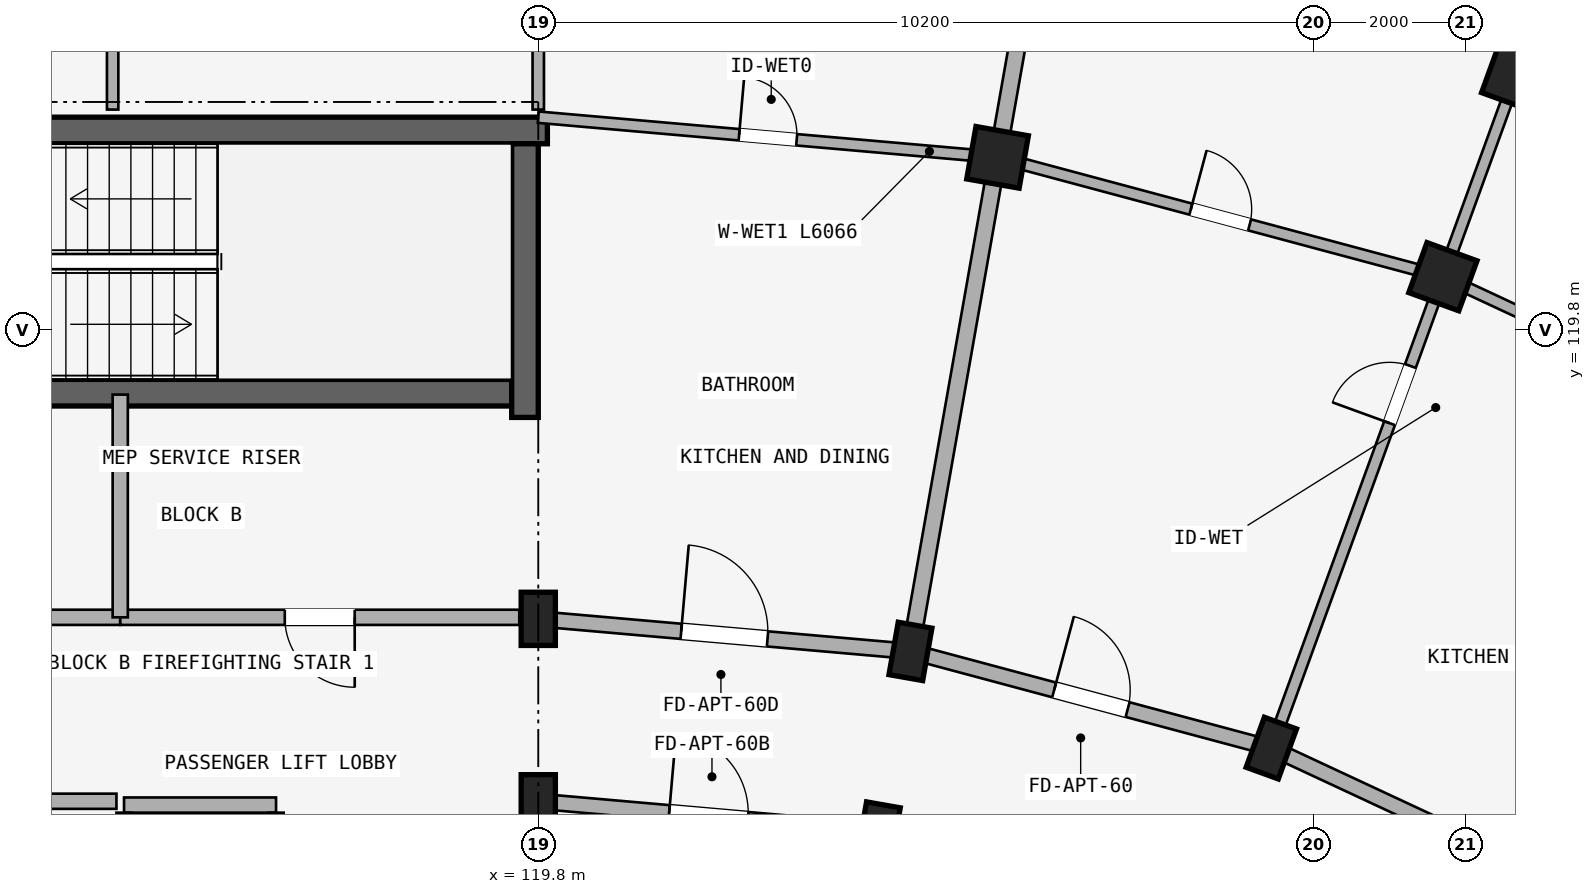
"""IFC4 building model, lengths in metres.
Left out: names, types, materials, properties, quantities, classifications, styles, units other than length and angle.
Written with IfcOpenShell. Run it as: python <this file> out.ifc"""

import sys

from ifc_helpers import new_model, si_unit, direction, frame, frame_2d, origin, origin_2d, place, context, subcontext, project, spatial, rectangle, extrude, element, fill, save


model = new_model("IFC4")
c1 = context("Model", 3, precision=1e-05, world=origin(), true_north=direction((0.0, 1.0)))
c2 = subcontext(c1, "Body", "Model", "MODEL_VIEW")
j1 = project(units=[si_unit("LENGTHUNIT", "METRE"), si_unit("PLANEANGLEUNIT", "RADIAN")], contexts=[c1])
p1 = place(None, origin())
s1 = spatial("IfcSite", under=j1, at=p1, CompositionType="ELEMENT")
p2 = place(p1, origin())
s2 = spatial("IfcBuilding", under=s1, at=p2, CompositionType="ELEMENT")
p3 = place(p2, frame((0.0, 0.0, 18.15)))
s3 = spatial("IfcBuildingStorey", under=s2, at=p3, CompositionType="ELEMENT", Elevation=18.15)
p4 = place(p3, frame((119.92, 122.425, 0.0), z_axis=(0.0, 0.0, 1.0), x_axis=(-1.0, 0.0, 0.0)))
e1 = element("IfcWall", 1, at=p4, inside=s3, PredefinedType="SHEAR", context=c2, shape_type="SweptSolid", body=[
    extrude(rectangle(XDim=8.545, YDim=0.35, at=frame_2d((4.272, 0.0))), origin(), (0.0, 0.0, 1.0), 2.93),
])
p5 = place(p3, frame((119.45, 118.975, 0.0), z_axis=(0.0, 0.0, 1.0), x_axis=(-1.0, 0.0, 0.0)))
e2 = element("IfcWall", 2, at=p5, inside=s3, PredefinedType="SHEAR", context=c2, shape_type="SweptSolid", body=[
    extrude(rectangle(XDim=8.075, YDim=0.35, at=frame_2d((4.038, 0.0))), origin(), (0.0, 0.0, 1.0), 2.93),
])
p6 = place(p5, frame((6.38, 0.0, 0.0)))
e3 = element("IfcOpeningElement", 3, at=p6, cuts=e2, PredefinedType="OPENING", context=c2, shape_type="SweptSolid", body=[
    extrude(rectangle(XDim=1.24, YDim=2.15, at=frame_2d((0.62, 1.075))), frame((0.0, 0.185, 0.0), z_axis=(0.0, -1.0, 0.0), x_axis=(1.0, 0.0, 0.0)), (0.0, 0.0, 1.0), 0.37),
])
p7 = place(p3, frame((119.625, 118.65, 0.0), z_axis=(0.0, 0.0, 1.0), x_axis=(0.0, 1.0, 0.0)))
e4 = element("IfcWall", 4, at=p7, inside=s3, PredefinedType="SHEAR", context=c2, shape_type="SweptSolid", body=[
    extrude(rectangle(XDim=3.6, YDim=0.35, at=frame_2d((1.8, 0.0))), origin(), (0.0, 0.0, 1.0), 2.93),
])
for number, where, z_axis, x_axis in (
    (5, (119.8, 113.6, 0.0), (0.0, 0.0, 1.0), (1.0, 0.0, 0.0)),
    (6, (119.8, 116.0, 0.0), (0.0, 0.0, 1.0), (1.0, 0.0, 0.0)),
    (7, (124.28, 113.208, 0.0), (0.0, 0.0, 1.0), (-0.985, 0.174, 0.0)),
    (8, (124.697, 115.572, 0.0), (0.0, 0.0, 1.0), (-0.985, 0.174, 0.0)),
):
    element("IfcColumn", number, at=place(p3, frame(where, z_axis=z_axis, x_axis=x_axis)), inside=s3, PredefinedType="COLUMN", context=c2, shape_type="SweptSolid", body=[
        extrude(rectangle(XDim=0.45, YDim=0.7, at=origin_2d()), origin(), (0.0, 0.0, 1.0), 2.93),
    ])
p8 = place(p3, frame((125.843, 122.071, 0.0), z_axis=(0.0, 0.0, 1.0), x_axis=(-0.984807753012, 0.173648177667, 0.0)))
e9 = element("IfcColumn", 9, at=p8, inside=s3, PredefinedType="COLUMN", context=c2, shape_type="SweptSolid", body=[
    extrude(rectangle(XDim=0.7, YDim=0.7, at=origin_2d()), origin(), (0.0, 0.0, 1.0), 2.93),
])
p9 = place(p3, frame((129.445, 114.299, 0.0), z_axis=(0.0, 0.0, 1.0), x_axis=(-0.939692620786, 0.342020143326, 0.0)))
e10 = element("IfcColumn", 10, at=p9, inside=s3, PredefinedType="COLUMN", context=c2, shape_type="SweptSolid", body=[
    extrude(rectangle(XDim=0.45, YDim=0.7, at=origin_2d()), origin(), (0.0, 0.0, 1.0), 2.93),
])
for number, where, z_axis, x_axis in (
    (11, (131.702, 120.501, 0.0), (0.0, 0.0, 1.0), (-0.94, 0.342, 0.0)),
    (12, (132.66, 123.132, 0.0), (0.0, 0.0, 1.0), (-0.94, 0.342, 0.0)),
):
    element("IfcColumn", number, at=place(p3, frame(where, z_axis=z_axis, x_axis=x_axis)), inside=s3, PredefinedType="COLUMN", context=c2, shape_type="SweptSolid", body=[
        extrude(rectangle(XDim=0.7, YDim=0.7, at=origin_2d()), origin(), (0.0, 0.0, 1.0), 2.93),
    ])
p10 = place(p3, frame((114.3, 116.02, 0.0), z_axis=(0.0, 0.0, 1.0), x_axis=(-1.0, 0.0, 0.0)))
e13 = element("IfcWall", 13, at=p10, inside=s3, PredefinedType="STANDARD", context=c2, shape_type="SweptSolid", body=[
    extrude(rectangle(XDim=5.65, YDim=0.2, at=frame_2d((2.825, 0.0))), origin(), (0.0, 0.0, 1.0), 2.372),
])
p11 = place(p10, frame((1.923, 0.0, 0.0)))
e14 = element("IfcOpeningElement", 14, at=p11, cuts=e13, PredefinedType="OPENING", context=c2, shape_type="SweptSolid", body=[
    extrude(rectangle(XDim=1.24, YDim=2.15, at=frame_2d((0.62, 1.075))), frame((0.0, 0.11, 0.0), z_axis=(0.0, -1.0, 0.0), x_axis=(1.0, 0.0, 0.0)), (0.0, 0.0, 1.0), 0.22),
])
p12 = place(p3, frame((119.55, 116.02, 0.0), z_axis=(0.0, 0.0, 1.0), x_axis=(-1.0, 0.0, 0.0)))
e15 = element("IfcWall", 15, at=p12, inside=s3, PredefinedType="STANDARD", context=c2, shape_type="SweptSolid", body=[
    extrude(rectangle(XDim=5.25, YDim=0.2, at=frame_2d((2.625, 0.0))), origin(), (0.0, 0.0, 1.0), 2.372),
])
p13 = place(p12, frame((2.165, 0.0, 0.0)))
e16 = element("IfcOpeningElement", 16, at=p13, cuts=e15, PredefinedType="OPENING", context=c2, shape_type="SweptSolid", body=[
    extrude(rectangle(XDim=0.92, YDim=2.1, at=frame_2d((0.46, 1.05))), frame((0.0, 0.11, 0.0), z_axis=(0.0, -1.0, 0.0), x_axis=(1.0, 0.0, 0.0)), (0.0, 0.0, 1.0), 0.22),
])
p14 = place(p3, frame((114.3, 116.02, 0.0), z_axis=(0.0, 0.0, 1.0), x_axis=(0.0, 1.0, 0.0)))
e17 = element("IfcWall", 17, at=p14, inside=s3, PredefinedType="STANDARD", context=c2, shape_type="SweptSolid", body=[
    extrude(rectangle(XDim=2.93, YDim=0.2, at=frame_2d((1.465, 0.0))), origin(), (0.0, 0.0, 1.0), 2.372),
])
p15 = place(p3, frame((116.35, 113.55, 0.0), z_axis=(0.0, 0.0, 1.0), x_axis=(-1.0, 0.0, 0.0)))
e18 = element("IfcWall", 18, at=p15, inside=s3, PredefinedType="STANDARD", context=c2, shape_type="SweptSolid", body=[
    extrude(rectangle(XDim=2.0, YDim=0.2, at=frame_2d((1.0, 0.0))), origin(), (0.0, 0.0, 1.0), 2.372),
])
p16 = place(p3, frame((116.35, 110.85, 0.0), z_axis=(0.0, 0.0, 1.0), x_axis=(0.0, 1.0, 0.0)))
e19 = element("IfcWall", 19, at=p16, inside=s3, PredefinedType="STANDARD", context=c2, shape_type="SweptSolid", body=[
    extrude(rectangle(XDim=2.6, YDim=0.2, at=frame_2d((1.3, 0.0))), origin(), (0.0, 0.0, 1.0), 2.372),
])
p17 = place(p3, frame((114.35, 110.85, 0.0), z_axis=(0.0, 0.0, 1.0), x_axis=(0.0, 1.0, 0.0)))
e20 = element("IfcWall", 20, at=p17, inside=s3, PredefinedType="STANDARD", context=c2, shape_type="SweptSolid", body=[
    extrude(rectangle(XDim=2.6, YDim=0.2, at=frame_2d((1.3, 0.0))), origin(), (0.0, 0.0, 1.0), 2.372),
])
p18 = place(p17, frame((0.79, 0.0, 0.0)))
e21 = element("IfcOpeningElement", 21, at=p18, cuts=e20, PredefinedType="OPENING", context=c2, shape_type="SweptSolid", body=[
    extrude(rectangle(XDim=1.02, YDim=2.15, at=frame_2d((0.51, 1.075))), frame((0.0, 0.11, 0.0), z_axis=(0.0, -1.0, 0.0), x_axis=(1.0, 0.0, 0.0)), (0.0, 0.0, 1.0), 0.22),
])
p19 = place(p3, frame((114.25, 113.6, 0.0), z_axis=(0.0, 0.0, 1.0), x_axis=(-1.0, 0.0, 0.0)))
e22 = element("IfcWall", 22, at=p19, inside=s3, PredefinedType="STANDARD", context=c2, shape_type="SweptSolid", body=[
    extrude(rectangle(XDim=5.6, YDim=0.2, at=frame_2d((2.8, 0.0))), origin(), (0.0, 0.0, 1.0), 2.372),
])
p20 = place(p19, frame((1.91, 0.0, 0.0)))
e23 = element("IfcOpeningElement", 23, at=p20, cuts=e22, PredefinedType="OPENING", context=c2, shape_type="SweptSolid", body=[
    extrude(rectangle(XDim=1.22, YDim=2.15, at=frame_2d((0.61, 1.075))), frame((0.0, 0.11, 0.0), z_axis=(0.0, -1.0, 0.0), x_axis=(1.0, 0.0, 0.0)), (0.0, 0.0, 1.0), 0.22),
])
p21 = place(p3, frame((114.2, 122.7, 0.0), z_axis=(0.0, 0.0, 1.0), x_axis=(0.0, 1.0, 0.0)))
e24 = element("IfcWall", 24, at=p21, inside=s3, PredefinedType="PARTITIONING", context=c2, shape_type="SweptSolid", body=[
    extrude(rectangle(XDim=10.82, YDim=0.15, at=frame_2d((5.41, 0.0))), origin(), (0.0, 0.0, 1.0), 2.372),
])
p22 = place(p21, frame((0.899, 0.0, 0.0)))
e25 = element("IfcOpeningElement", 25, at=p22, cuts=e24, PredefinedType="OPENING", context=c2, shape_type="SweptSolid", body=[
    extrude(rectangle(XDim=0.8, YDim=2.1, at=frame_2d((0.4, 1.05))), frame((0.0, 0.085, 0.0), z_axis=(0.0, -1.0, 0.0), x_axis=(1.0, 0.0, 0.0)), (0.0, 0.0, 1.0), 0.17),
])
p23 = place(p3, frame((119.8, 113.6, 0.0), z_axis=(0.0, 0.0, 1.0), x_axis=(0.996191949488, -0.087187153726, 0.0)))
e26 = element("IfcWall", 26, at=p23, inside=s3, PredefinedType="STANDARD", context=c2, shape_type="SweptSolid", body=[
    extrude(rectangle(XDim=4.497, YDim=0.2, at=frame_2d((2.249, 0.0))), origin(), (0.0, 0.0, 1.0), 2.372),
])
p24 = place(p23, frame((1.729, 0.0, 0.0)))
e27 = element("IfcOpeningElement", 27, at=p24, cuts=e26, PredefinedType="OPENING", context=c2, shape_type="SweptSolid", body=[
    extrude(rectangle(XDim=1.04, YDim=2.15, at=frame_2d((0.52, 1.075))), frame((0.0, 0.11, 0.0), z_axis=(0.0, -1.0, 0.0), x_axis=(1.0, 0.0, 0.0)), (0.0, 0.0, 1.0), 0.22),
])
p25 = place(p3, frame((119.8, 116.0, 0.0), z_axis=(0.0, 0.0, 1.0), x_axis=(0.996193663584, -0.087167566415, 0.0)))
e28 = element("IfcWall", 28, at=p25, inside=s3, PredefinedType="STANDARD", context=c2, shape_type="SweptSolid", body=[
    extrude(rectangle(XDim=4.916, YDim=0.2, at=frame_2d((2.458, 0.0))), origin(), (0.0, 0.0, 1.0), 2.372),
])
p26 = place(p25, frame((1.888, 0.0, 0.0)))
e29 = element("IfcOpeningElement", 29, at=p26, cuts=e28, PredefinedType="OPENING", context=c2, shape_type="SweptSolid", body=[
    extrude(rectangle(XDim=1.14, YDim=2.15, at=frame_2d((0.57, 1.075))), frame((0.0, 0.11, 0.0), z_axis=(0.0, -1.0, 0.0), x_axis=(1.0, 0.0, 0.0)), (0.0, 0.0, 1.0), 0.22),
])
p27 = place(p3, frame((124.697, 115.572, 0.0), z_axis=(0.0, 0.0, 1.0), x_axis=(0.965930095386, -0.258803112091, 0.0)))
e30 = element("IfcWall", 30, at=p27, inside=s3, PredefinedType="STANDARD", context=c2, shape_type="SweptSolid", body=[
    extrude(rectangle(XDim=4.916, YDim=0.2, at=frame_2d((2.458, 0.0))), origin(), (0.0, 0.0, 1.0), 2.372),
])
p28 = place(p27, frame((1.958, 0.0, 0.0)))
e31 = element("IfcOpeningElement", 31, at=p28, cuts=e30, PredefinedType="OPENING", context=c2, shape_type="SweptSolid", body=[
    extrude(rectangle(XDim=1.0, YDim=2.15, at=frame_2d((0.5, 1.075))), frame((0.0, 0.11, 0.0), z_axis=(0.0, -1.0, 0.0), x_axis=(1.0, 0.0, 0.0)), (0.0, 0.0, 1.0), 0.22),
])
p29 = place(p3, frame((129.445, 114.299, 0.0), z_axis=(0.0, 0.0, 1.0), x_axis=(0.906302381024, -0.422629854778, 0.0)))
e32 = element("IfcWall", 32, at=p29, inside=s3, PredefinedType="STANDARD", context=c2, shape_type="SweptSolid", body=[
    extrude(rectangle(XDim=4.915, YDim=0.2, at=frame_2d((2.458, 0.0))), origin(), (0.0, 0.0, 1.0), 2.372),
])
p30 = place(p3, frame((119.8, 110.35, 0.0), z_axis=(0.0, 0.0, 1.0), x_axis=(0.0, 1.0, 0.0)))
e33 = element("IfcWall", 33, at=p30, inside=s3, PredefinedType="STANDARD", context=c2, shape_type="SweptSolid", body=[
    extrude(rectangle(XDim=3.2, YDim=0.22, at=frame_2d((1.6, 0.0))), origin(), (0.0, 0.0, 1.0), 2.372),
])
p31 = place(p3, frame((119.8, 122.7, 0.0), z_axis=(0.0, 0.0, 1.0), x_axis=(0.0, 1.0, 0.0)))
e34 = element("IfcWall", 34, at=p31, inside=s3, PredefinedType="PARTITIONING", context=c2, shape_type="SweptSolid", body=[
    extrude(rectangle(XDim=10.82, YDim=0.15, at=frame_2d((5.41, 0.0))), origin(), (0.0, 0.0, 1.0), 2.372),
])
p32 = place(p31, frame((0.899, 0.0, 0.0)))
e35 = element("IfcOpeningElement", 35, at=p32, cuts=e34, PredefinedType="OPENING", context=c2, shape_type="SweptSolid", body=[
    extrude(rectangle(XDim=0.8, YDim=2.1, at=frame_2d((0.4, 1.05))), frame((0.0, 0.085, 0.0), z_axis=(0.0, -1.0, 0.0), x_axis=(1.0, 0.0, 0.0)), (0.0, 0.0, 1.0), 0.17),
])
p33 = place(p3, frame((124.714, 115.67, 0.0), z_axis=(0.0, 0.0, 1.0), x_axis=(0.173646216546, 0.984808098809, 0.0)))
e36 = element("IfcWall", 36, at=p33, inside=s3, PredefinedType="STANDARD", context=c2, shape_type="SweptSolid", body=[
    extrude(rectangle(XDim=17.42, YDim=0.22, at=frame_2d((8.71, 0.0))), origin(), (0.0, 0.0, 1.0), 2.372),
])
p34 = place(p3, frame((129.479, 114.393, 0.0), z_axis=(0.0, 0.0, 1.0), x_axis=(0.342022120477, 0.939691901159, 0.0)))
e37 = element("IfcWall", 37, at=p34, inside=s3, PredefinedType="PARTITIONING", context=c2, shape_type="SweptSolid", body=[
    extrude(rectangle(XDim=17.42, YDim=0.15, at=frame_2d((8.71, 0.0))), origin(), (0.0, 0.0, 1.0), 2.372),
])
p35 = place(p34, frame((4.45, 0.0, 0.0)))
e38 = element("IfcOpeningElement", 38, at=p35, cuts=e37, PredefinedType="OPENING", context=c2, shape_type="SweptSolid", body=[
    extrude(rectangle(XDim=0.8, YDim=2.1, at=frame_2d((0.4, 1.05))), frame((0.0, 0.085, 0.0), z_axis=(0.0, -1.0, 0.0), x_axis=(1.0, 0.0, 0.0)), (0.0, 0.0, 1.0), 0.17),
])
p36 = place(p3, frame((119.8, 122.6, 0.0), z_axis=(0.0, 0.0, 1.0), x_axis=(0.996193018494, -0.087174938512, 0.0)))
e39 = element("IfcWall", 39, at=p36, inside=s3, PredefinedType="PLUMBINGWALL", context=c2, shape_type="SweptSolid", body=[
    extrude(rectangle(XDim=6.066, YDim=0.15, at=frame_2d((3.033, 0.0))), origin(), (0.0, 0.0, 1.0), 2.372),
])
p37 = place(p36, frame((2.653, 0.0, 0.0)))
e40 = element("IfcOpeningElement", 40, at=p37, cuts=e39, PredefinedType="OPENING", context=c2, shape_type="SweptSolid", body=[
    extrude(rectangle(XDim=0.76, YDim=2.05, at=frame_2d((0.38, 1.025))), frame((0.0, 0.085, 0.0), z_axis=(0.0, -1.0, 0.0), x_axis=(1.0, 0.0, 0.0)), (0.0, 0.0, 1.0), 0.17),
])
p38 = place(p3, frame((125.843, 122.071, 0.0), z_axis=(0.0, 0.0, 1.0), x_axis=(0.965923618901, -0.258827283048, 0.0)))
e41 = element("IfcWall", 41, at=p38, inside=s3, PredefinedType="PLUMBINGWALL", context=c2, shape_type="SweptSolid", body=[
    extrude(rectangle(XDim=6.066, YDim=0.15, at=frame_2d((3.033, 0.0))), origin(), (0.0, 0.0, 1.0), 2.372),
])
p39 = place(p38, frame((2.633, 0.0, 0.0)))
e42 = element("IfcOpeningElement", 42, at=p39, cuts=e41, PredefinedType="OPENING", context=c2, shape_type="SweptSolid", body=[
    extrude(rectangle(XDim=0.8, YDim=2.1, at=frame_2d((0.4, 1.05))), frame((0.0, 0.085, 0.0), z_axis=(0.0, -1.0, 0.0), x_axis=(1.0, 0.0, 0.0)), (0.0, 0.0, 1.0), 0.17),
])
p40 = place(p3, frame((131.702, 120.501, 0.0), z_axis=(0.0, 0.0, 1.0), x_axis=(0.906312656069, -0.42260781991, 0.0)))
e43 = element("IfcWall", 43, at=p40, inside=s3, PredefinedType="PLUMBINGWALL", context=c2, shape_type="SweptSolid", body=[
    extrude(rectangle(XDim=6.066, YDim=0.15, at=frame_2d((3.033, 0.0))), origin(), (0.0, 0.0, 1.0), 2.372),
])
p41 = place(p40, frame((2.613, 0.0, 0.0)))
e44 = element("IfcOpeningElement", 44, at=p41, cuts=e43, PredefinedType="OPENING", context=c2, shape_type="SweptSolid", body=[
    extrude(rectangle(XDim=0.84, YDim=2.1, at=frame_2d((0.42, 1.05))), frame((0.0, 0.085, 0.0), z_axis=(0.0, -1.0, 0.0), x_axis=(1.0, 0.0, 0.0)), (0.0, 0.0, 1.0), 0.17),
])
p42 = place(p13, frame((0.92, 0.0, 0.0), z_axis=(0.0, 0.0, 1.0), x_axis=(-1.0, 0.0, 0.0)))
e45 = element("IfcDoor", 45, at=p42, inside=s3, OperationType="SINGLE_SWING_RIGHT", PredefinedType="DOOR", context=c2, shape_type="SweptSolid", body=[
    extrude(rectangle(XDim=0.92, YDim=2.1, at=frame_2d((0.46, 1.05))), frame((0.0, 0.025, 0.0), z_axis=(0.0, -1.0, 0.0), x_axis=(1.0, 0.0, 0.0)), (0.0, 0.0, 1.0), 0.05),
])
fill(e16, e45)
p43 = place(p35, origin())
e46 = element("IfcDoor", 46, at=p43, inside=s3, OperationType="SINGLE_SWING_LEFT", PredefinedType="DOOR", context=c2, shape_type="SweptSolid", body=[
    extrude(rectangle(XDim=0.8, YDim=2.1, at=frame_2d((0.4, 1.05))), frame((0.0, 0.025, 0.0), z_axis=(0.0, -1.0, 0.0), x_axis=(1.0, 0.0, 0.0)), (0.0, 0.0, 1.0), 0.05),
])
fill(e38, e46)
p44 = place(p26, origin())
e47 = element("IfcDoor", 47, at=p44, inside=s3, OperationType="SINGLE_SWING_LEFT", PredefinedType="DOOR", context=c2, shape_type="SweptSolid", body=[
    extrude(rectangle(XDim=1.14, YDim=2.15, at=frame_2d((0.57, 1.075))), frame((0.0, 0.025, 0.0), z_axis=(0.0, -1.0, 0.0), x_axis=(1.0, 0.0, 0.0)), (0.0, 0.0, 1.0), 0.05),
])
fill(e29, e47)
p45 = place(p37, frame((0.76, 0.0, 0.0), z_axis=(0.0, 0.0, 1.0), x_axis=(-1.0, 0.0, 0.0)))
e48 = element("IfcDoor", 48, at=p45, inside=s3, OperationType="SINGLE_SWING_RIGHT", PredefinedType="DOOR", context=c2, shape_type="SweptSolid", body=[
    extrude(rectangle(XDim=0.76, YDim=2.05, at=frame_2d((0.38, 1.025))), frame((0.0, 0.025, 0.0), z_axis=(0.0, -1.0, 0.0), x_axis=(1.0, 0.0, 0.0)), (0.0, 0.0, 1.0), 0.05),
])
fill(e40, e48)
p46 = place(p28, origin())
e49 = element("IfcDoor", 49, at=p46, inside=s3, OperationType="SINGLE_SWING_LEFT", PredefinedType="DOOR", context=c2, shape_type="SweptSolid", body=[
    extrude(rectangle(XDim=1.0, YDim=2.15, at=frame_2d((0.5, 1.075))), frame((0.0, 0.025, 0.0), z_axis=(0.0, -1.0, 0.0), x_axis=(1.0, 0.0, 0.0)), (0.0, 0.0, 1.0), 0.05),
])
fill(e31, e49)
p47 = place(p39, frame((0.8, 0.0, 0.0), z_axis=(0.0, 0.0, 1.0), x_axis=(-1.0, 0.0, 0.0)))
e50 = element("IfcDoor", 50, at=p47, inside=s3, OperationType="SINGLE_SWING_RIGHT", PredefinedType="DOOR", context=c2, shape_type="SweptSolid", body=[
    extrude(rectangle(XDim=0.8, YDim=2.1, at=frame_2d((0.4, 1.05))), frame((0.0, 0.025, 0.0), z_axis=(0.0, -1.0, 0.0), x_axis=(1.0, 0.0, 0.0)), (0.0, 0.0, 1.0), 0.05),
])
fill(e42, e50)
p48 = place(p24, frame((1.04, 0.0, 0.0), z_axis=(0.0, 0.0, 1.0), x_axis=(-1.0, 0.0, 0.0)))
e51 = element("IfcDoor", 51, at=p48, inside=s3, OperationType="SINGLE_SWING_RIGHT", PredefinedType="DOOR", context=c2, shape_type="SweptSolid", body=[
    extrude(rectangle(XDim=1.04, YDim=2.15, at=frame_2d((0.52, 1.075))), frame((0.0, 0.025, 0.0), z_axis=(0.0, -1.0, 0.0), x_axis=(1.0, 0.0, 0.0)), (0.0, 0.0, 1.0), 0.05),
])
fill(e27, e51)
save(model, sys.argv[1])
